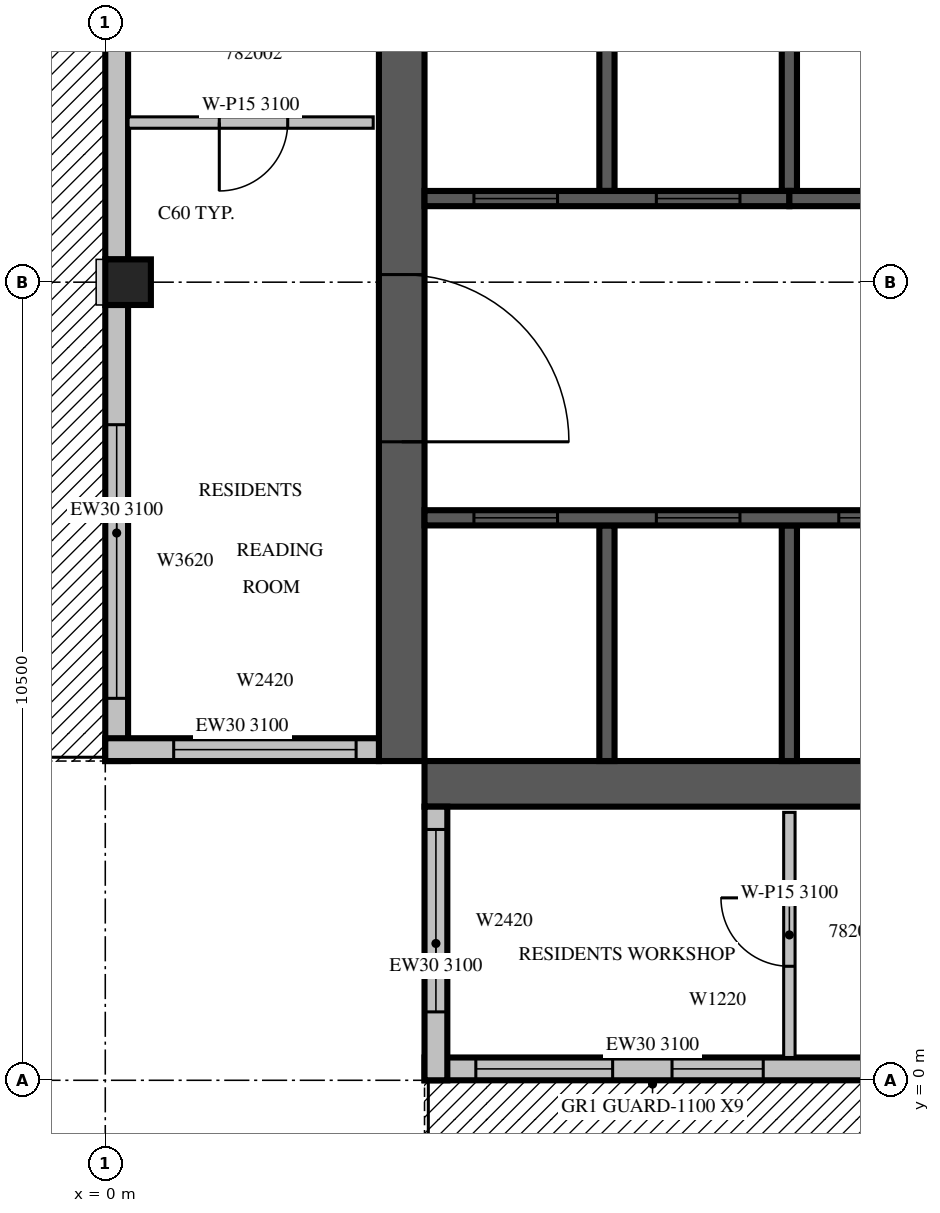
"""IFC4 building model, lengths in metres.
Left out: names, types, materials, properties, quantities, classifications, styles, units other than length and angle.
Written with IfcOpenShell. Run it as: python <this file> out.ifc"""

import sys

from ifc_helpers import new_model, si_unit, direction, frame, frame_2d, origin, origin_2d, place, context, subcontext, project, spatial, rectangle, extrude, source, transform, mapped, element, fill, save


model = new_model("IFC4")
c1 = context("Model", 3, precision=1e-05, world=origin(), true_north=direction((0.0, 1.0)))
c2 = subcontext(c1, "Body", "Model", "MODEL_VIEW")
j1 = project(units=[si_unit("LENGTHUNIT", "METRE"), si_unit("PLANEANGLEUNIT", "RADIAN")], contexts=[c1])
p1 = place(None, origin())
s1 = spatial("IfcSite", under=j1, at=p1, CompositionType="ELEMENT")
p2 = place(p1, origin())
s2 = spatial("IfcBuilding", under=s1, at=p2, CompositionType="ELEMENT")
p3 = place(p2, frame((0.0, 0.0, 347.5)))
s3 = spatial("IfcBuildingStorey", under=s2, at=p3, CompositionType="ELEMENT", Elevation=347.5)
m1 = source(origin(), c2, "Body", "SweptSolid", [
    extrude(rectangle(XDim=0.6, YDim=0.6, at=origin_2d()), origin(), (0.0, 0.0, 1.0), 3.5),
])
p4 = place(p3, frame((0.3, 10.5, 0.0), z_axis=(0.0, 0.0, 1.0), x_axis=(1.0, 0.0, 0.0)))
e1 = element("IfcColumn", 1, at=p4, inside=s3, PredefinedType="COLUMN", context=c2, shape_type="MappedRepresentation", body=[
    mapped(m1, transform((0.0, 0.0, 0.0), scale=1.0)),
])
m2 = source(origin(), c2, "Body", "SweptSolid", [
    extrude(rectangle(XDim=17.4, YDim=0.6, at=frame_2d((8.7, 0.0))), origin(), (0.0, 0.0, 1.0), 3.5),
])
p5 = place(p3, frame((3.9, 4.2, 0.0), z_axis=(0.0, 0.0, 1.0), x_axis=(0.0, 1.0, 0.0)))
e2 = element("IfcWall", 2, at=p5, inside=s3, PredefinedType="SHEAR", context=c2, shape_type="MappedRepresentation", body=[
    mapped(m2, transform((0.0, 0.0, 0.0), scale=1.0)),
])
m3 = source(origin(), c2, "Body", "SweptSolid", [
    extrude(rectangle(XDim=2.2, YDim=2.1, at=frame_2d((1.1, 1.05))), frame((0.0, 0.31, 0.0), z_axis=(0.0, -1.0, 0.0), x_axis=(1.0, 0.0, 0.0)), (0.0, 0.0, 1.0), 0.62),
])
p6 = place(p5, frame((4.2, 0.0, 0.0)))
e3 = element("IfcOpeningElement", 3, at=p6, cuts=e2, PredefinedType="OPENING", context=c2, shape_type="MappedRepresentation", body=[
    mapped(m3, transform((0.0, 0.0, 0.0), scale=1.0)),
])
p7 = place(p3, frame((4.2, 3.9, 0.0), z_axis=(0.0, 0.0, 1.0), x_axis=(1.0, 0.0, 0.0)))
e4 = element("IfcWall", 4, at=p7, inside=s3, PredefinedType="SHEAR", context=c2, shape_type="MappedRepresentation", body=[
    mapped(m2, transform((0.0, 0.0, 0.0), scale=1.0)),
])
m4 = source(origin(), c2, "Body", "SweptSolid", [
    extrude(rectangle(XDim=0.9, YDim=2.1, at=frame_2d((0.45, 1.05))), frame((0.0, 0.31, 0.0), z_axis=(0.0, -1.0, 0.0), x_axis=(1.0, 0.0, 0.0)), (0.0, 0.0, 1.0), 0.62),
])
p8 = place(p7, frame((12.8, 0.0, 0.0)))
e5 = element("IfcOpeningElement", 5, at=p8, cuts=e4, PredefinedType="OPENING", context=c2, shape_type="MappedRepresentation", body=[
    mapped(m4, transform((0.0, 0.0, 0.0), scale=1.0)),
])
m5 = source(origin(), c2, "Body", "SweptSolid", [
    extrude(rectangle(XDim=6.0, YDim=0.3, at=frame_2d((3.0, 0.0))), origin(), (0.0, 0.0, 1.0), 3.1),
])
p9 = place(p3, frame((4.2, 0.15, 0.0), z_axis=(0.0, 0.0, 1.0), x_axis=(1.0, 0.0, 0.0)))
e6 = element("IfcWall", 6, at=p9, inside=s3, PredefinedType="STANDARD", context=c2, shape_type="MappedRepresentation", body=[
    mapped(m5, transform((0.0, 0.0, 0.0), scale=1.0)),
])
m6 = source(origin(), c2, "Body", "SweptSolid", [
    extrude(rectangle(XDim=1.8, YDim=2.4, at=frame_2d((0.9, 1.2))), frame((0.0, 0.16, 0.0), z_axis=(0.0, -1.0, 0.0), x_axis=(1.0, 0.0, 0.0)), (0.0, 0.0, 1.0), 0.32),
])
p10 = place(p9, frame((0.675, 0.0, 0.0)))
e7 = element("IfcOpeningElement", 7, at=p10, cuts=e6, PredefinedType="OPENING", context=c2, shape_type="MappedRepresentation", body=[
    mapped(m6, transform((0.0, 0.0, 0.0), scale=1.0)),
])
m7 = source(origin(), c2, "Body", "SweptSolid", [
    extrude(rectangle(XDim=1.2, YDim=2.0, at=frame_2d((0.6, 1.0))), frame((0.0, 0.16, 0.0), z_axis=(0.0, -1.0, 0.0), x_axis=(1.0, 0.0, 0.0)), (0.0, 0.0, 1.0), 0.32),
])
p11 = place(p9, frame((3.256, 0.0, 0.6)))
e8 = element("IfcOpeningElement", 8, at=p11, cuts=e6, PredefinedType="OPENING", context=c2, shape_type="MappedRepresentation", body=[
    mapped(m7, transform((0.0, 0.0, 0.0), scale=1.0)),
])
m8 = source(origin(), c2, "Body", "SweptSolid", [
    extrude(rectangle(XDim=7.05, YDim=0.3, at=frame_2d((3.525, 0.0))), origin(), (0.0, 0.0, 1.0), 3.1),
])
p12 = place(p3, frame((0.15, 17.85, 0.0), z_axis=(0.0, 0.0, 1.0), x_axis=(0.0, -1.0, 0.0)))
e9 = element("IfcWall", 9, at=p12, inside=s3, PredefinedType="STANDARD", context=c2, shape_type="MappedRepresentation", body=[
    mapped(m8, transform((0.0, 0.0, 0.0), scale=1.0)),
])
p13 = place(p12, frame((0.675, 0.0, 0.0)))
e10 = element("IfcOpeningElement", 10, at=p13, cuts=e9, PredefinedType="OPENING", context=c2, shape_type="MappedRepresentation", body=[
    mapped(m6, transform((0.0, 0.0, 0.0), scale=1.0)),
])
p14 = place(p3, frame((0.15, 10.2, 0.0), z_axis=(0.0, 0.0, 1.0), x_axis=(0.0, -1.0, 0.0)))
e11 = element("IfcWall", 11, at=p14, inside=s3, PredefinedType="STANDARD", context=c2, shape_type="MappedRepresentation", body=[
    mapped(m5, transform((0.0, 0.0, 0.0), scale=1.0)),
])
m9 = source(origin(), c2, "Body", "SweptSolid", [
    extrude(rectangle(XDim=3.6, YDim=2.0, at=frame_2d((1.8, 1.0))), frame((0.0, 0.16, 0.0), z_axis=(0.0, -1.0, 0.0), x_axis=(1.0, 0.0, 0.0)), (0.0, 0.0, 1.0), 0.32),
])
p15 = place(p14, frame((1.575, 0.0, 0.6)))
e12 = element("IfcOpeningElement", 12, at=p15, cuts=e11, PredefinedType="OPENING", context=c2, shape_type="MappedRepresentation", body=[
    mapped(m9, transform((0.0, 0.0, 0.0), scale=1.0)),
])
m10 = source(origin(), c2, "Body", "SweptSolid", [
    extrude(rectangle(XDim=3.6, YDim=0.3, at=frame_2d((1.8, 0.0))), origin(), (0.0, 0.0, 1.0), 3.1),
])
p16 = place(p3, frame((0.0, 4.35, 0.0), z_axis=(0.0, 0.0, 1.0), x_axis=(1.0, 0.0, 0.0)))
e13 = element("IfcWall", 13, at=p16, inside=s3, PredefinedType="STANDARD", context=c2, shape_type="MappedRepresentation", body=[
    mapped(m10, transform((0.0, 0.0, 0.0), scale=1.0)),
])
m11 = source(origin(), c2, "Body", "SweptSolid", [
    extrude(rectangle(XDim=2.4, YDim=2.0, at=frame_2d((1.2, 1.0))), frame((0.0, 0.16, 0.0), z_axis=(0.0, -1.0, 0.0), x_axis=(1.0, 0.0, 0.0)), (0.0, 0.0, 1.0), 0.32),
])
p17 = place(p16, frame((0.9, 0.0, 0.6)))
e14 = element("IfcOpeningElement", 14, at=p17, cuts=e13, PredefinedType="OPENING", context=c2, shape_type="MappedRepresentation", body=[
    mapped(m11, transform((0.0, 0.0, 0.0), scale=1.0)),
])
p18 = place(p3, frame((4.35, 3.6, 0.0), z_axis=(0.0, 0.0, 1.0), x_axis=(0.0, -1.0, 0.0)))
e15 = element("IfcWall", 15, at=p18, inside=s3, PredefinedType="STANDARD", context=c2, shape_type="MappedRepresentation", body=[
    mapped(m10, transform((0.0, 0.0, 0.0), scale=1.0)),
])
p19 = place(p18, frame((0.3, 0.0, 0.6)))
e16 = element("IfcOpeningElement", 16, at=p19, cuts=e15, PredefinedType="OPENING", context=c2, shape_type="MappedRepresentation", body=[
    mapped(m11, transform((0.0, 0.0, 0.0), scale=1.0)),
])
m12 = source(origin(), c2, "Body", "SweptSolid", [
    extrude(rectangle(XDim=3.1, YDim=0.2, at=frame_2d((1.55, 0.0))), origin(), (0.0, 0.0, 1.0), 3.5),
])
for number, where, z_axis, x_axis in (
    (17, (6.6, 4.2, 0.0), (0.0, 0.0, 1.0), (0.0, 1.0, 0.0)),
    (18, (9.0, 4.2, 0.0), (0.0, 0.0, 1.0), (0.0, 1.0, 0.0)),
):
    element("IfcWall", number, at=place(p3, frame(where, z_axis=z_axis, x_axis=x_axis)), inside=s3, PredefinedType="SOLIDWALL", context=c2, shape_type="MappedRepresentation", body=[
        mapped(m12, transform((0.0, 0.0, 0.0), scale=1.0)),
    ])
m13 = source(origin(), c2, "Body", "SweptSolid", [
    extrude(rectangle(XDim=3.0, YDim=0.2, at=frame_2d((1.5, 0.0))), origin(), (0.0, 0.0, 1.0), 3.5),
])
p20 = place(p3, frame((6.6, 11.7, 0.0), z_axis=(0.0, 0.0, 1.0), x_axis=(0.0, 1.0, 0.0)))
e19 = element("IfcWall", 19, at=p20, inside=s3, PredefinedType="SOLIDWALL", context=c2, shape_type="MappedRepresentation", body=[
    mapped(m13, transform((0.0, 0.0, 0.0), scale=1.0)),
])
m14 = source(origin(), c2, "Body", "SweptSolid", [
    extrude(rectangle(XDim=3.0, YDim=0.2, at=frame_2d((1.5, 0.0))), origin(), (0.0, 0.0, 1.0), 3.1),
])
p21 = place(p3, frame((9.0, 11.7, 0.0), z_axis=(0.0, 0.0, 1.0), x_axis=(0.0, 1.0, 0.0)))
e20 = element("IfcWall", 20, at=p21, inside=s3, PredefinedType="SOLIDWALL", context=c2, shape_type="MappedRepresentation", body=[
    mapped(m14, transform((0.0, 0.0, 0.0), scale=1.0)),
])
m15 = source(origin(), c2, "Body", "SweptSolid", [
    extrude(rectangle(XDim=9.6, YDim=0.2, at=frame_2d((4.8, 0.0))), origin(), (0.0, 0.0, 1.0), 3.5),
])
p22 = place(p3, frame((4.2, 7.4, 0.0), z_axis=(0.0, 0.0, 1.0), x_axis=(1.0, 0.0, 0.0)))
e21 = element("IfcWall", 21, at=p22, inside=s3, PredefinedType="SOLIDWALL", context=c2, shape_type="MappedRepresentation", body=[
    mapped(m15, transform((0.0, 0.0, 0.0), scale=1.0)),
])
m16 = source(origin(), c2, "Body", "SweptSolid", [
    extrude(rectangle(XDim=1.1, YDim=2.1, at=frame_2d((0.55, 1.05))), frame((0.0, 0.11, 0.0), z_axis=(0.0, -1.0, 0.0), x_axis=(1.0, 0.0, 0.0)), (0.0, 0.0, 1.0), 0.22),
])
p23 = place(p22, frame((0.65, 0.0, 0.0)))
e22 = element("IfcOpeningElement", 22, at=p23, cuts=e21, PredefinedType="OPENING", context=c2, shape_type="MappedRepresentation", body=[
    mapped(m16, transform((0.0, 0.0, 0.0), scale=1.0)),
])
p24 = place(p22, frame((3.05, 0.0, 0.0)))
e23 = element("IfcOpeningElement", 23, at=p24, cuts=e21, PredefinedType="OPENING", context=c2, shape_type="MappedRepresentation", body=[
    mapped(m16, transform((0.0, 0.0, 0.0), scale=1.0)),
])
p25 = place(p22, frame((5.45, 0.0, 0.0)))
e24 = element("IfcOpeningElement", 24, at=p25, cuts=e21, PredefinedType="OPENING", context=c2, shape_type="MappedRepresentation", body=[
    mapped(m16, transform((0.0, 0.0, 0.0), scale=1.0)),
])
p26 = place(p22, frame((7.85, 0.0, 0.0)))
e25 = element("IfcOpeningElement", 25, at=p26, cuts=e21, PredefinedType="OPENING", context=c2, shape_type="MappedRepresentation", body=[
    mapped(m16, transform((0.0, 0.0, 0.0), scale=1.0)),
])
m17 = source(origin(), c2, "Body", "SweptSolid", [
    extrude(rectangle(XDim=4.8, YDim=0.2, at=frame_2d((2.4, 0.0))), origin(), (0.0, 0.0, 1.0), 3.5),
])
p27 = place(p3, frame((4.2, 11.6, 0.0), z_axis=(0.0, 0.0, 1.0), x_axis=(1.0, 0.0, 0.0)))
e26 = element("IfcWall", 26, at=p27, inside=s3, PredefinedType="SOLIDWALL", context=c2, shape_type="MappedRepresentation", body=[
    mapped(m17, transform((0.0, 0.0, 0.0), scale=1.0)),
])
p28 = place(p27, frame((0.65, 0.0, 0.0)))
e27 = element("IfcOpeningElement", 27, at=p28, cuts=e26, PredefinedType="OPENING", context=c2, shape_type="MappedRepresentation", body=[
    mapped(m16, transform((0.0, 0.0, 0.0), scale=1.0)),
])
p29 = place(p27, frame((3.05, 0.0, 0.0)))
e28 = element("IfcOpeningElement", 28, at=p29, cuts=e26, PredefinedType="OPENING", context=c2, shape_type="MappedRepresentation", body=[
    mapped(m16, transform((0.0, 0.0, 0.0), scale=1.0)),
])
m18 = source(origin(), c2, "Body", "SweptSolid", [
    extrude(rectangle(XDim=4.8, YDim=0.2, at=frame_2d((2.4, 0.0))), origin(), (0.0, 0.0, 1.0), 3.1),
])
p30 = place(p3, frame((9.0, 11.6, 0.0), z_axis=(0.0, 0.0, 1.0), x_axis=(1.0, 0.0, 0.0)))
e29 = element("IfcWall", 29, at=p30, inside=s3, PredefinedType="SOLIDWALL", context=c2, shape_type="MappedRepresentation", body=[
    mapped(m18, transform((0.0, 0.0, 0.0), scale=1.0)),
])
m19 = source(origin(), c2, "Body", "SweptSolid", [
    extrude(rectangle(XDim=0.9, YDim=2.1, at=frame_2d((0.45, 1.05))), frame((0.0, 0.11, 0.0), z_axis=(0.0, -1.0, 0.0), x_axis=(1.0, 0.0, 0.0)), (0.0, 0.0, 1.0), 0.22),
])
p31 = place(p30, frame((1.95, 0.0, 0.0)))
e30 = element("IfcOpeningElement", 30, at=p31, cuts=e29, PredefinedType="OPENING", context=c2, shape_type="MappedRepresentation", body=[
    mapped(m19, transform((0.0, 0.0, 0.0), scale=1.0)),
])
m20 = source(origin(), c2, "Body", "SweptSolid", [
    extrude(rectangle(XDim=3.225, YDim=0.15, at=frame_2d((1.613, 0.0))), origin(), (0.0, 0.0, 1.0), 3.1),
])
p32 = place(p3, frame((9.0, 3.525, 0.0), z_axis=(0.0, 0.0, 1.0), x_axis=(0.0, -1.0, 0.0)))
e31 = element("IfcWall", 31, at=p32, inside=s3, PredefinedType="PARTITIONING", context=c2, shape_type="MappedRepresentation", body=[
    mapped(m20, transform((0.0, 0.0, 0.0), scale=1.0)),
])
m21 = source(origin(), c2, "Body", "SweptSolid", [
    extrude(rectangle(XDim=0.9, YDim=2.1, at=frame_2d((0.45, 1.05))), frame((0.0, 0.085, 0.0), z_axis=(0.0, -1.0, 0.0), x_axis=(1.0, 0.0, 0.0)), (0.0, 0.0, 1.0), 0.17),
])
p33 = place(p32, frame((1.125, 0.0, 0.0)))
e32 = element("IfcOpeningElement", 32, at=p33, cuts=e31, PredefinedType="OPENING", context=c2, shape_type="MappedRepresentation", body=[
    mapped(m21, transform((0.0, 0.0, 0.0), scale=1.0)),
])
p34 = place(p3, frame((0.3, 12.6, 0.0), z_axis=(0.0, 0.0, 1.0), x_axis=(1.0, 0.0, 0.0)))
e33 = element("IfcWall", 33, at=p34, inside=s3, PredefinedType="PARTITIONING", context=c2, shape_type="MappedRepresentation", body=[
    mapped(m20, transform((0.0, 0.0, 0.0), scale=1.0)),
])
p35 = place(p34, frame((1.2, 0.0, 0.0)))
e34 = element("IfcOpeningElement", 34, at=p35, cuts=e33, PredefinedType="OPENING", context=c2, shape_type="MappedRepresentation", body=[
    mapped(m21, transform((0.0, 0.0, 0.0), scale=1.0)),
])
m22 = source(origin(), c2, "Body", "SweptSolid", [
    extrude(rectangle(XDim=1.8, YDim=2.4, at=frame_2d((0.9, 1.2))), frame((0.0, 0.025, 0.0), z_axis=(0.0, -1.0, 0.0), x_axis=(1.0, 0.0, 0.0)), (0.0, 0.0, 1.0), 0.05),
])
p36 = place(p10, origin())
e35 = element("IfcDoor", 35, at=p36, inside=s3, OperationType="SLIDING_TO_LEFT", PredefinedType="DOOR", context=c2, shape_type="MappedRepresentation", body=[
    mapped(m22, transform((0.0, 0.0, 0.0), scale=1.0)),
])
fill(e7, e35)
m23 = source(origin(), c2, "Body", "SweptSolid", [
    extrude(rectangle(XDim=1.2, YDim=2.0, at=frame_2d((0.6, 1.0))), frame((0.0, 0.03, 0.0), z_axis=(0.0, -1.0, 0.0), x_axis=(1.0, 0.0, 0.0)), (0.0, 0.0, 1.0), 0.06),
])
p37 = place(p11, origin())
e36 = element("IfcWindow", 36, at=p37, inside=s3, PartitioningType="SINGLE_PANEL", PredefinedType="WINDOW", context=c2, shape_type="MappedRepresentation", body=[
    mapped(m23, transform((0.0, 0.0, 0.0), scale=1.0)),
])
fill(e8, e36)
m24 = source(origin(), c2, "Body", "SweptSolid", [
    extrude(rectangle(XDim=3.6, YDim=2.0, at=frame_2d((1.8, 1.0))), frame((0.0, 0.03, 0.0), z_axis=(0.0, -1.0, 0.0), x_axis=(1.0, 0.0, 0.0)), (0.0, 0.0, 1.0), 0.06),
])
p38 = place(p15, origin())
e37 = element("IfcWindow", 37, at=p38, inside=s3, PartitioningType="SINGLE_PANEL", PredefinedType="WINDOW", context=c2, shape_type="MappedRepresentation", body=[
    mapped(m24, transform((0.0, 0.0, 0.0), scale=1.0)),
])
fill(e12, e37)
m25 = source(origin(), c2, "Body", "SweptSolid", [
    extrude(rectangle(XDim=2.4, YDim=2.0, at=frame_2d((1.2, 1.0))), frame((0.0, 0.03, 0.0), z_axis=(0.0, -1.0, 0.0), x_axis=(1.0, 0.0, 0.0)), (0.0, 0.0, 1.0), 0.06),
])
p39 = place(p17, origin())
e38 = element("IfcWindow", 38, at=p39, inside=s3, PartitioningType="SINGLE_PANEL", PredefinedType="WINDOW", context=c2, shape_type="MappedRepresentation", body=[
    mapped(m25, transform((0.0, 0.0, 0.0), scale=1.0)),
])
fill(e14, e38)
p40 = place(p19, origin())
e39 = element("IfcWindow", 39, at=p40, inside=s3, PartitioningType="SINGLE_PANEL", PredefinedType="WINDOW", context=c2, shape_type="MappedRepresentation", body=[
    mapped(m25, transform((0.0, 0.0, 0.0), scale=1.0)),
])
fill(e16, e39)
m26 = source(origin(), c2, "Body", "SweptSolid", [
    extrude(rectangle(XDim=1.1, YDim=2.1, at=frame_2d((0.55, 1.05))), frame((0.0, 0.025, 0.0), z_axis=(0.0, -1.0, 0.0), x_axis=(1.0, 0.0, 0.0)), (0.0, 0.0, 1.0), 0.05),
])
p41 = place(p23, origin())
e40 = element("IfcDoor", 40, at=p41, inside=s3, OperationType="SLIDING_TO_LEFT", PredefinedType="DOOR", context=c2, shape_type="MappedRepresentation", body=[
    mapped(m26, transform((0.0, 0.0, 0.0), scale=1.0)),
])
fill(e22, e40)
p42 = place(p24, origin())
e41 = element("IfcDoor", 41, at=p42, inside=s3, OperationType="SLIDING_TO_LEFT", PredefinedType="DOOR", context=c2, shape_type="MappedRepresentation", body=[
    mapped(m26, transform((0.0, 0.0, 0.0), scale=1.0)),
])
fill(e23, e41)
p43 = place(p25, origin())
e42 = element("IfcDoor", 42, at=p43, inside=s3, OperationType="SLIDING_TO_LEFT", PredefinedType="DOOR", context=c2, shape_type="MappedRepresentation", body=[
    mapped(m26, transform((0.0, 0.0, 0.0), scale=1.0)),
])
fill(e24, e42)
p44 = place(p28, origin())
e43 = element("IfcDoor", 43, at=p44, inside=s3, OperationType="SLIDING_TO_LEFT", PredefinedType="DOOR", context=c2, shape_type="MappedRepresentation", body=[
    mapped(m26, transform((0.0, 0.0, 0.0), scale=1.0)),
])
fill(e27, e43)
p45 = place(p29, origin())
e44 = element("IfcDoor", 44, at=p45, inside=s3, OperationType="SLIDING_TO_LEFT", PredefinedType="DOOR", context=c2, shape_type="MappedRepresentation", body=[
    mapped(m26, transform((0.0, 0.0, 0.0), scale=1.0)),
])
fill(e28, e44)
m27 = source(origin(), c2, "Body", "SweptSolid", [
    extrude(rectangle(XDim=2.2, YDim=2.1, at=frame_2d((1.1, 1.05))), frame((0.0, 0.025, 0.0), z_axis=(0.0, -1.0, 0.0), x_axis=(1.0, 0.0, 0.0)), (0.0, 0.0, 1.0), 0.05),
])
p46 = place(p6, origin())
e45 = element("IfcDoor", 45, at=p46, inside=s3, OperationType="DOUBLE_DOOR_SINGLE_SWING", PredefinedType="DOOR", context=c2, shape_type="MappedRepresentation", body=[
    mapped(m27, transform((0.0, 0.0, 0.0), scale=1.0)),
])
fill(e3, e45)
m28 = source(origin(), c2, "Body", "SweptSolid", [
    extrude(rectangle(XDim=0.9, YDim=2.1, at=frame_2d((0.45, 1.05))), frame((0.0, 0.025, 0.0), z_axis=(0.0, -1.0, 0.0), x_axis=(1.0, 0.0, 0.0)), (0.0, 0.0, 1.0), 0.05),
])
p47 = place(p33, origin())
e46 = element("IfcDoor", 46, at=p47, inside=s3, OperationType="SINGLE_SWING_RIGHT", PredefinedType="DOOR", context=c2, shape_type="MappedRepresentation", body=[
    mapped(m28, transform((0.0, 0.0, 0.0), scale=1.0)),
])
fill(e32, e46)
p48 = place(p35, origin())
e47 = element("IfcDoor", 47, at=p48, inside=s3, OperationType="SINGLE_SWING_RIGHT", PredefinedType="DOOR", context=c2, shape_type="MappedRepresentation", body=[
    mapped(m28, transform((0.0, 0.0, 0.0), scale=1.0)),
])
fill(e34, e47)
save(model, sys.argv[1])
